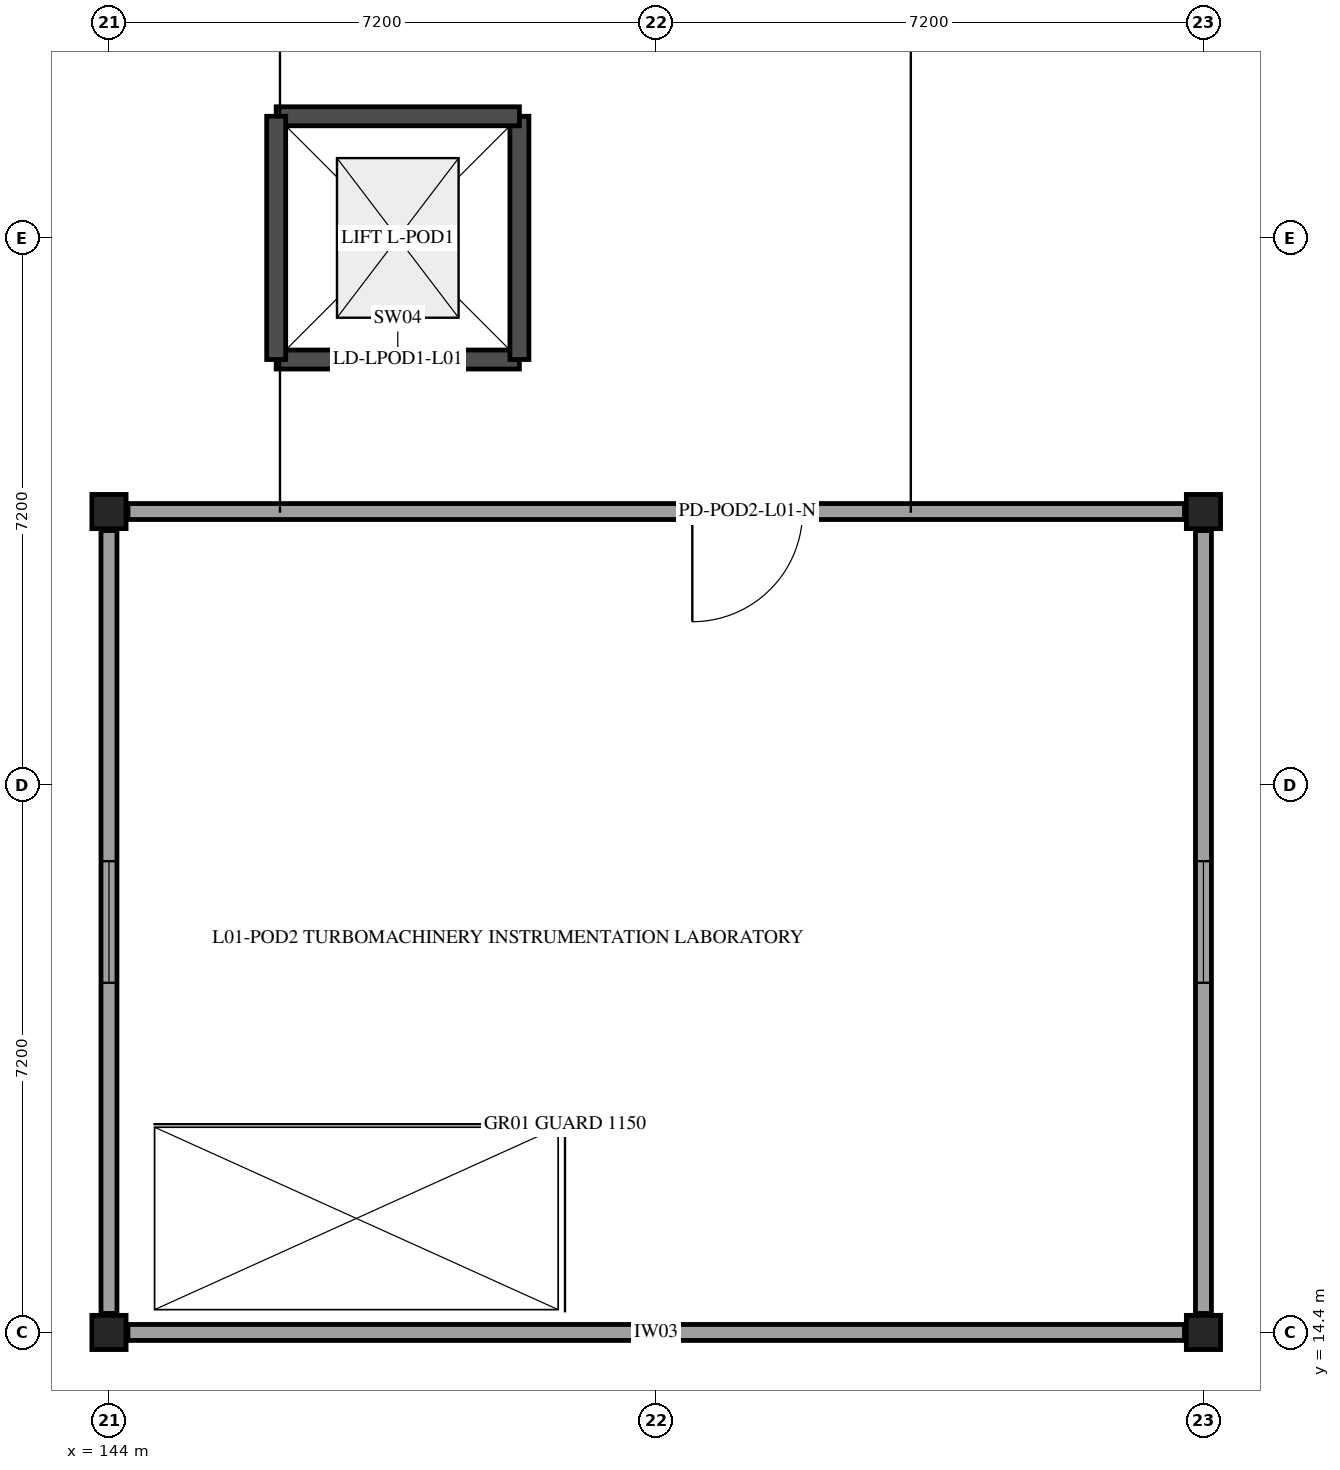
"""IFC4 building model, lengths in metres.
Left out: names, types, materials, properties, quantities, classifications, styles, units other than length and angle.
Written with IfcOpenShell. Run it as: python <this file> out.ifc"""

import sys

from ifc_helpers import new_model, si_unit, direction, frame, frame_2d, origin, origin_2d, place, context, subcontext, project, spatial, rectangle, extrude, element, fill, save


model = new_model("IFC4")
c1 = context("Model", 3, precision=1e-05, world=origin(), true_north=direction((0.0, 1.0)))
c2 = subcontext(c1, "Body", "Model", "MODEL_VIEW")
j1 = project(units=[si_unit("LENGTHUNIT", "METRE"), si_unit("PLANEANGLEUNIT", "RADIAN")], contexts=[c1])
p1 = place(None, origin())
s1 = spatial("IfcSite", under=j1, at=p1, CompositionType="ELEMENT")
p2 = place(p1, origin())
s2 = spatial("IfcBuilding", under=s1, at=p2, CompositionType="ELEMENT")
p3 = place(p2, frame((0.0, 0.0, 5.4)))
s3 = spatial("IfcBuildingStorey", under=s2, at=p3, CompositionType="ELEMENT", Elevation=5.4)
for number, where, z_axis, x_axis in (
    (1, (144.0, 14.4, 0.0), (0.0, 0.0, 1.0), (1.0, 0.0, 0.0)),
    (2, (144.0, 25.2, 0.0), (0.0, 0.0, 1.0), (1.0, 0.0, 0.0)),
    (3, (158.4, 14.4, 0.0), (0.0, 0.0, 1.0), (1.0, 0.0, 0.0)),
    (4, (158.4, 25.2, 0.0), (0.0, 0.0, 1.0), (1.0, 0.0, 0.0)),
):
    element("IfcColumn", number, at=place(p3, frame(where, z_axis=z_axis, x_axis=x_axis)), inside=s3, PredefinedType="COLUMN", context=c2, shape_type="SweptSolid", body=[
        extrude(rectangle(XDim=0.45, YDim=0.45, at=origin_2d()), origin(), (0.0, 0.0, 1.0), 3.8),
    ])
p4 = place(p3, frame((144.25, 14.4, 0.0), z_axis=(0.0, 0.0, 1.0), x_axis=(1.0, 0.0, 0.0)))
e5 = element("IfcWall", 5, at=p4, inside=s3, PredefinedType="PARTITIONING", context=c2, shape_type="SweptSolid", body=[
    extrude(rectangle(XDim=13.9, YDim=0.21, at=frame_2d((6.95, 0.0))), origin(), (0.0, 0.0, 1.0), 2.923),
])
p5 = place(p3, frame((158.4, 14.65, 0.0), z_axis=(0.0, 0.0, 1.0), x_axis=(0.0, 1.0, 0.0)))
e6 = element("IfcWall", 6, at=p5, inside=s3, PredefinedType="PARTITIONING", context=c2, shape_type="SweptSolid", body=[
    extrude(rectangle(XDim=10.3, YDim=0.21, at=frame_2d((5.15, 0.0))), origin(), (0.0, 0.0, 1.0), 2.923),
])
p6 = place(p5, frame((4.35, 0.0, 1.1)))
e7 = element("IfcOpeningElement", 7, at=p6, cuts=e6, PredefinedType="OPENING", context=c2, shape_type="SweptSolid", body=[
    extrude(rectangle(XDim=1.6, YDim=1.2, at=frame_2d((0.8, 0.6))), frame((0.0, 0.115, 0.0), z_axis=(0.0, -1.0, 0.0), x_axis=(1.0, 0.0, 0.0)), (0.0, 0.0, 1.0), 0.23),
])
p7 = place(p3, frame((158.15, 25.2, 0.0), z_axis=(0.0, 0.0, 1.0), x_axis=(-1.0, 0.0, 0.0)))
e8 = element("IfcWall", 8, at=p7, inside=s3, PredefinedType="PARTITIONING", context=c2, shape_type="SweptSolid", body=[
    extrude(rectangle(XDim=13.9, YDim=0.21, at=frame_2d((6.95, 0.0))), origin(), (0.0, 0.0, 1.0), 2.923),
])
p8 = place(p7, frame((5.025, 0.0, 0.0)))
e9 = element("IfcOpeningElement", 9, at=p8, cuts=e8, PredefinedType="OPENING", context=c2, shape_type="SweptSolid", body=[
    extrude(rectangle(XDim=1.45, YDim=2.2, at=frame_2d((0.725, 1.1))), frame((0.0, 0.115, 0.0), z_axis=(0.0, -1.0, 0.0), x_axis=(1.0, 0.0, 0.0)), (0.0, 0.0, 1.0), 0.23),
])
p9 = place(p3, frame((144.0, 24.95, 0.0), z_axis=(0.0, 0.0, 1.0), x_axis=(0.0, -1.0, 0.0)))
e10 = element("IfcWall", 10, at=p9, inside=s3, PredefinedType="PARTITIONING", context=c2, shape_type="SweptSolid", body=[
    extrude(rectangle(XDim=10.3, YDim=0.21, at=frame_2d((5.15, 0.0))), origin(), (0.0, 0.0, 1.0), 2.923),
])
p10 = place(p9, frame((4.35, 0.0, 1.1)))
e11 = element("IfcOpeningElement", 11, at=p10, cuts=e10, PredefinedType="OPENING", context=c2, shape_type="SweptSolid", body=[
    extrude(rectangle(XDim=1.6, YDim=1.2, at=frame_2d((0.8, 0.6))), frame((0.0, 0.115, 0.0), z_axis=(0.0, -1.0, 0.0), x_axis=(1.0, 0.0, 0.0)), (0.0, 0.0, 1.0), 0.23),
])
p11 = place(p3, frame((146.2, 27.2, 0.0), z_axis=(0.0, 0.0, 1.0), x_axis=(1.0, 0.0, 0.0)))
e12 = element("IfcWall", 12, at=p11, inside=s3, PredefinedType="SHEAR", context=c2, shape_type="SweptSolid", body=[
    extrude(rectangle(XDim=3.2, YDim=0.25, at=frame_2d((1.6, 0.0))), origin(), (0.0, 0.0, 1.0), 3.6),
])
p12 = place(p11, frame((1.1, 0.0, 0.0)))
e13 = element("IfcOpeningElement", 13, at=p12, cuts=e12, PredefinedType="OPENING", context=c2, shape_type="SweptSolid", body=[
    extrude(rectangle(XDim=1.0, YDim=2.15, at=frame_2d((0.5, 1.075))), frame((0.0, 0.135, 0.0), z_axis=(0.0, -1.0, 0.0), x_axis=(1.0, 0.0, 0.0)), (0.0, 0.0, 1.0), 0.27),
])
for number, where, z_axis, x_axis in (
    (14, (149.4, 27.2, 0.0), (0.0, 0.0, 1.0), (0.0, 1.0, 0.0)),
    (15, (149.4, 30.4, 0.0), (0.0, 0.0, 1.0), (-1.0, 0.0, 0.0)),
    (16, (146.2, 30.4, 0.0), (0.0, 0.0, 1.0), (0.0, -1.0, 0.0)),
):
    element("IfcWall", number, at=place(p3, frame(where, z_axis=z_axis, x_axis=x_axis)), inside=s3, PredefinedType="SHEAR", context=c2, shape_type="SweptSolid", body=[
        extrude(rectangle(XDim=3.2, YDim=0.25, at=frame_2d((1.6, 0.0))), origin(), (0.0, 0.0, 1.0), 3.6),
    ])
p13 = place(p6, origin())
e17 = element("IfcWindow", 17, at=p13, inside=s3, PartitioningType="SINGLE_PANEL", PredefinedType="WINDOW", context=c2, shape_type="SweptSolid", body=[
    extrude(rectangle(XDim=1.6, YDim=1.2, at=frame_2d((0.8, 0.6))), frame((0.0, 0.03, 0.0), z_axis=(0.0, -1.0, 0.0), x_axis=(1.0, 0.0, 0.0)), (0.0, 0.0, 1.0), 0.06),
])
fill(e7, e17)
p14 = place(p8, frame((1.45, 0.0, 0.0), z_axis=(0.0, 0.0, 1.0), x_axis=(-1.0, 0.0, 0.0)))
e18 = element("IfcDoor", 18, at=p14, inside=s3, OperationType="SINGLE_SWING_RIGHT", PredefinedType="DOOR", context=c2, shape_type="SweptSolid", body=[
    extrude(rectangle(XDim=1.45, YDim=2.2, at=frame_2d((0.725, 1.1))), frame((0.0, 0.025, 0.0), z_axis=(0.0, -1.0, 0.0), x_axis=(1.0, 0.0, 0.0)), (0.0, 0.0, 1.0), 0.05),
])
fill(e9, e18)
p15 = place(p10, origin())
e19 = element("IfcWindow", 19, at=p15, inside=s3, PartitioningType="SINGLE_PANEL", PredefinedType="WINDOW", context=c2, shape_type="SweptSolid", body=[
    extrude(rectangle(XDim=1.6, YDim=1.2, at=frame_2d((0.8, 0.6))), frame((0.0, 0.03, 0.0), z_axis=(0.0, -1.0, 0.0), x_axis=(1.0, 0.0, 0.0)), (0.0, 0.0, 1.0), 0.06),
])
fill(e11, e19)
p16 = place(p12, origin())
e20 = element("IfcDoor", 20, at=p16, inside=s3, OperationType="SLIDING_TO_LEFT", PredefinedType="DOOR", context=c2, shape_type="SweptSolid", body=[
    extrude(rectangle(XDim=1.0, YDim=2.15, at=frame_2d((0.5, 1.075))), frame((0.0, 0.025, 0.0), z_axis=(0.0, -1.0, 0.0), x_axis=(1.0, 0.0, 0.0)), (0.0, 0.0, 1.0), 0.05),
])
fill(e13, e20)
save(model, sys.argv[1])
